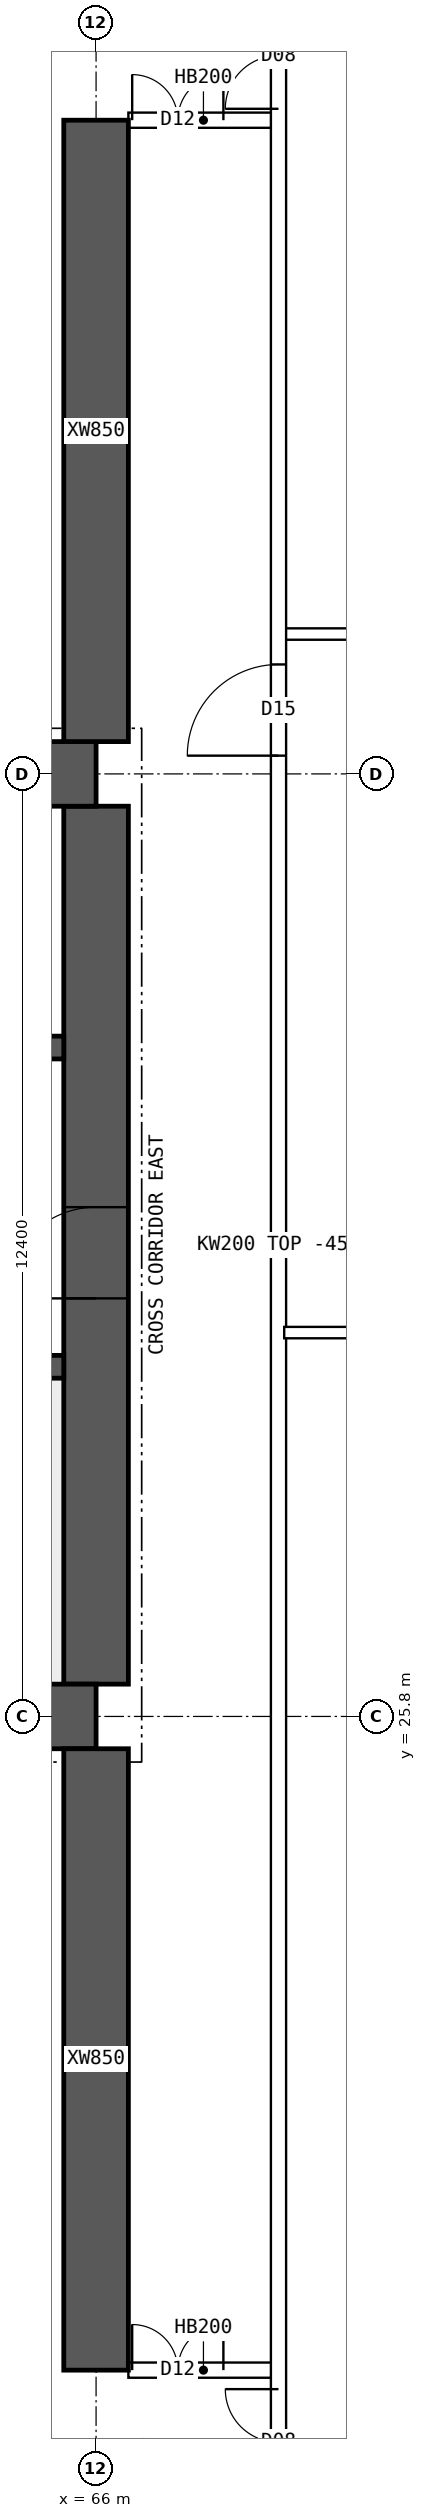
"""IFC4 building model, lengths in metres.
Left out: names, types, materials, properties, quantities, classifications, styles, units other than length and angle.
Written with IfcOpenShell. Run it as: python <this file> out.ifc"""

import sys

from ifc_helpers import new_model, si_unit, direction, frame, frame_2d, origin, place, context, subcontext, project, spatial, polyline, rectangle, outline, extrude, element, fill, save


model = new_model("IFC4")
c1 = context("Model", 3, precision=1e-05, world=origin(), true_north=direction((0.0, 1.0)))
c2 = subcontext(c1, "Body", "Model", "MODEL_VIEW")
j1 = project(units=[si_unit("LENGTHUNIT", "METRE"), si_unit("PLANEANGLEUNIT", "RADIAN")], contexts=[c1])
p1 = place(None, origin())
s1 = spatial("IfcSite", under=j1, at=p1, CompositionType="ELEMENT")
p2 = place(p1, origin())
s2 = spatial("IfcBuilding", under=s1, at=p2, CompositionType="ELEMENT")
p3 = place(p2, frame((0.0, 0.0, 144.85)))
s3 = spatial("IfcBuildingStorey", under=s2, at=p3, CompositionType="ELEMENT", Elevation=144.85)
for number, where, z_axis, x_axis in (
    (1, (18.0, 25.8, 0.0), (0.0, 0.0, 1.0), (1.0, 0.0, 0.0)),
    (2, (18.0, 38.2, 0.0), (0.0, 0.0, 1.0), (1.0, 0.0, 0.0)),
):
    element("IfcWall", number, at=place(p3, frame(where, z_axis=z_axis, x_axis=x_axis)), inside=s3, PredefinedType="SHEAR", context=c2, shape_type="SweptSolid", body=[
        extrude(rectangle(XDim=48.0, YDim=0.85, at=frame_2d((24.0, 0.0))), origin(), (0.0, 0.0, 1.0), 3.75),
    ])
p4 = place(p3, frame((66.0, 26.225, 0.0), z_axis=(0.0, 0.0, 1.0), x_axis=(0.0, 1.0, 0.0)))
e3 = element("IfcWall", 3, at=p4, inside=s3, PredefinedType="SHEAR", context=c2, shape_type="SweptSolid", body=[
    extrude(rectangle(XDim=11.55, YDim=0.85, at=frame_2d((5.775, 0.0))), origin(), (0.0, 0.0, 1.0), 3.75),
])
p5 = place(p4, frame((5.075, 0.0, 0.0)))
e4 = element("IfcOpeningElement", 4, at=p5, cuts=e3, PredefinedType="OPENING", context=c2, shape_type="SweptSolid", body=[
    extrude(rectangle(XDim=1.2, YDim=2.1, at=frame_2d((0.6, 1.05))), frame((0.0, 0.435, 0.0), z_axis=(0.0, -1.0, 0.0), x_axis=(1.0, 0.0, 0.0)), (0.0, 0.0, 1.0), 0.87),
])
p6 = place(p3, frame((18.425, 30.4, 0.0), z_axis=(0.0, 0.0, 1.0), x_axis=(1.0, 0.0, 0.0)))
e5 = element("IfcWall", 5, at=p6, inside=s3, PredefinedType="SHEAR", context=c2, shape_type="SweptSolid", body=[
    extrude(rectangle(XDim=47.15, YDim=0.3, at=frame_2d((23.575, 0.0))), origin(), (0.0, 0.0, 1.0), 3.75),
])
p7 = place(p6, frame((0.4, 0.0, 0.0)))
e6 = element("IfcOpeningElement", 6, at=p7, cuts=e5, PredefinedType="OPENING", context=c2, shape_type="SweptSolid", body=[
    extrude(rectangle(XDim=1.0, YDim=2.1, at=frame_2d((0.5, 1.05))), frame((0.0, 0.16, 0.0), z_axis=(0.0, -1.0, 0.0), x_axis=(1.0, 0.0, 0.0)), (0.0, 0.0, 1.0), 0.32),
])
p8 = place(p6, frame((45.75, 0.0, 0.0)))
e7 = element("IfcOpeningElement", 7, at=p8, cuts=e5, PredefinedType="OPENING", context=c2, shape_type="SweptSolid", body=[
    extrude(rectangle(XDim=1.0, YDim=2.1, at=frame_2d((0.5, 1.05))), frame((0.0, 0.16, 0.0), z_axis=(0.0, -1.0, 0.0), x_axis=(1.0, 0.0, 0.0)), (0.0, 0.0, 1.0), 0.32),
])
p9 = place(p6, frame((8.325, 0.0, 0.0)))
e8 = element("IfcOpeningElement", 8, at=p9, cuts=e5, PredefinedType="OPENING", context=c2, shape_type="SweptSolid", body=[
    extrude(rectangle(XDim=1.1, YDim=2.1, at=frame_2d((0.55, 1.05))), frame((0.0, 0.16, 0.0), z_axis=(0.0, -1.0, 0.0), x_axis=(1.0, 0.0, 0.0)), (0.0, 0.0, 1.0), 0.32),
])
p10 = place(p6, frame((10.925, 0.0, 0.0)))
e9 = element("IfcOpeningElement", 9, at=p10, cuts=e5, PredefinedType="OPENING", context=c2, shape_type="SweptSolid", body=[
    extrude(rectangle(XDim=1.1, YDim=2.1, at=frame_2d((0.55, 1.05))), frame((0.0, 0.16, 0.0), z_axis=(0.0, -1.0, 0.0), x_axis=(1.0, 0.0, 0.0)), (0.0, 0.0, 1.0), 0.32),
])
p11 = place(p6, frame((13.525, 0.0, 0.0)))
e10 = element("IfcOpeningElement", 10, at=p11, cuts=e5, PredefinedType="OPENING", context=c2, shape_type="SweptSolid", body=[
    extrude(rectangle(XDim=1.1, YDim=2.1, at=frame_2d((0.55, 1.05))), frame((0.0, 0.16, 0.0), z_axis=(0.0, -1.0, 0.0), x_axis=(1.0, 0.0, 0.0)), (0.0, 0.0, 1.0), 0.32),
])
p12 = place(p6, frame((16.125, 0.0, 0.0)))
e11 = element("IfcOpeningElement", 11, at=p12, cuts=e5, PredefinedType="OPENING", context=c2, shape_type="SweptSolid", body=[
    extrude(rectangle(XDim=1.1, YDim=2.1, at=frame_2d((0.55, 1.05))), frame((0.0, 0.16, 0.0), z_axis=(0.0, -1.0, 0.0), x_axis=(1.0, 0.0, 0.0)), (0.0, 0.0, 1.0), 0.32),
])
p13 = place(p6, frame((18.9, 0.0, 0.0)))
e12 = element("IfcOpeningElement", 12, at=p13, cuts=e5, PredefinedType="OPENING", context=c2, shape_type="SweptSolid", body=[
    extrude(rectangle(XDim=0.9, YDim=2.1, at=frame_2d((0.45, 1.05))), frame((0.0, 0.16, 0.0), z_axis=(0.0, -1.0, 0.0), x_axis=(1.0, 0.0, 0.0)), (0.0, 0.0, 1.0), 0.32),
])
p14 = place(p6, frame((30.192, 0.0, 0.0)))
e13 = element("IfcOpeningElement", 13, at=p14, cuts=e5, PredefinedType="OPENING", context=c2, shape_type="SweptSolid", body=[
    extrude(rectangle(XDim=1.1, YDim=2.1, at=frame_2d((0.55, 1.05))), frame((0.0, 0.16, 0.0), z_axis=(0.0, -1.0, 0.0), x_axis=(1.0, 0.0, 0.0)), (0.0, 0.0, 1.0), 0.32),
])
p15 = place(p6, frame((33.725, 0.0, 0.0)))
e14 = element("IfcOpeningElement", 14, at=p15, cuts=e5, PredefinedType="OPENING", context=c2, shape_type="SweptSolid", body=[
    extrude(rectangle(XDim=1.1, YDim=2.1, at=frame_2d((0.55, 1.05))), frame((0.0, 0.16, 0.0), z_axis=(0.0, -1.0, 0.0), x_axis=(1.0, 0.0, 0.0)), (0.0, 0.0, 1.0), 0.32),
])
p16 = place(p6, frame((37.258, 0.0, 0.0)))
e15 = element("IfcOpeningElement", 15, at=p16, cuts=e5, PredefinedType="OPENING", context=c2, shape_type="SweptSolid", body=[
    extrude(rectangle(XDim=1.1, YDim=2.1, at=frame_2d((0.55, 1.05))), frame((0.0, 0.16, 0.0), z_axis=(0.0, -1.0, 0.0), x_axis=(1.0, 0.0, 0.0)), (0.0, 0.0, 1.0), 0.32),
])
p17 = place(p3, frame((18.425, 34.6, 0.0), z_axis=(0.0, 0.0, 1.0), x_axis=(1.0, 0.0, 0.0)))
e16 = element("IfcWall", 16, at=p17, inside=s3, PredefinedType="SHEAR", context=c2, shape_type="SweptSolid", body=[
    extrude(rectangle(XDim=47.15, YDim=0.3, at=frame_2d((23.575, 0.0))), origin(), (0.0, 0.0, 1.0), 3.75),
])
p18 = place(p17, frame((0.9, 0.0, 0.0)))
e17 = element("IfcOpeningElement", 17, at=p18, cuts=e16, PredefinedType="OPENING", context=c2, shape_type="SweptSolid", body=[
    extrude(rectangle(XDim=1.1, YDim=2.1, at=frame_2d((0.55, 1.05))), frame((0.0, 0.16, 0.0), z_axis=(0.0, -1.0, 0.0), x_axis=(1.0, 0.0, 0.0)), (0.0, 0.0, 1.0), 0.32),
])
p19 = place(p17, frame((45.15, 0.0, 0.0)))
e18 = element("IfcOpeningElement", 18, at=p19, cuts=e16, PredefinedType="OPENING", context=c2, shape_type="SweptSolid", body=[
    extrude(rectangle(XDim=1.1, YDim=2.1, at=frame_2d((0.55, 1.05))), frame((0.0, 0.16, 0.0), z_axis=(0.0, -1.0, 0.0), x_axis=(1.0, 0.0, 0.0)), (0.0, 0.0, 1.0), 0.32),
])
p20 = place(p17, frame((4.175, 0.0, 0.0)))
e19 = element("IfcOpeningElement", 19, at=p20, cuts=e16, PredefinedType="OPENING", context=c2, shape_type="SweptSolid", body=[
    extrude(rectangle(XDim=0.9, YDim=2.1, at=frame_2d((0.45, 1.05))), frame((0.0, 0.16, 0.0), z_axis=(0.0, -1.0, 0.0), x_axis=(1.0, 0.0, 0.0)), (0.0, 0.0, 1.0), 0.32),
])
p21 = place(p17, frame((42.075, 0.0, 0.0)))
e20 = element("IfcOpeningElement", 20, at=p21, cuts=e16, PredefinedType="OPENING", context=c2, shape_type="SweptSolid", body=[
    extrude(rectangle(XDim=0.9, YDim=2.1, at=frame_2d((0.45, 1.05))), frame((0.0, 0.16, 0.0), z_axis=(0.0, -1.0, 0.0), x_axis=(1.0, 0.0, 0.0)), (0.0, 0.0, 1.0), 0.32),
])
p22 = place(p17, frame((8.95, 0.0, 0.0)))
e21 = element("IfcOpeningElement", 21, at=p22, cuts=e16, PredefinedType="OPENING", context=c2, shape_type="SweptSolid", body=[
    extrude(rectangle(XDim=0.9, YDim=2.1, at=frame_2d((0.45, 1.05))), frame((0.0, 0.16, 0.0), z_axis=(0.0, -1.0, 0.0), x_axis=(1.0, 0.0, 0.0)), (0.0, 0.0, 1.0), 0.32),
])
p23 = place(p17, frame((12.924, 0.0, 0.0)))
e22 = element("IfcOpeningElement", 22, at=p23, cuts=e16, PredefinedType="OPENING", context=c2, shape_type="SweptSolid", body=[
    extrude(rectangle(XDim=0.9, YDim=2.1, at=frame_2d((0.45, 1.05))), frame((0.0, 0.16, 0.0), z_axis=(0.0, -1.0, 0.0), x_axis=(1.0, 0.0, 0.0)), (0.0, 0.0, 1.0), 0.32),
])
p24 = place(p17, frame((16.571, 0.0, 0.0)))
e23 = element("IfcOpeningElement", 23, at=p24, cuts=e16, PredefinedType="OPENING", context=c2, shape_type="SweptSolid", body=[
    extrude(rectangle(XDim=0.9, YDim=2.1, at=frame_2d((0.45, 1.05))), frame((0.0, 0.16, 0.0), z_axis=(0.0, -1.0, 0.0), x_axis=(1.0, 0.0, 0.0)), (0.0, 0.0, 1.0), 0.32),
])
p25 = place(p17, frame((20.33, 0.0, 0.0)))
e24 = element("IfcOpeningElement", 24, at=p25, cuts=e16, PredefinedType="OPENING", context=c2, shape_type="SweptSolid", body=[
    extrude(rectangle(XDim=0.9, YDim=2.1, at=frame_2d((0.45, 1.05))), frame((0.0, 0.16, 0.0), z_axis=(0.0, -1.0, 0.0), x_axis=(1.0, 0.0, 0.0)), (0.0, 0.0, 1.0), 0.32),
])
p26 = place(p17, frame((24.736, 0.0, 0.0)))
e25 = element("IfcOpeningElement", 25, at=p26, cuts=e16, PredefinedType="OPENING", context=c2, shape_type="SweptSolid", body=[
    extrude(rectangle(XDim=0.9, YDim=2.1, at=frame_2d((0.45, 1.05))), frame((0.0, 0.16, 0.0), z_axis=(0.0, -1.0, 0.0), x_axis=(1.0, 0.0, 0.0)), (0.0, 0.0, 1.0), 0.32),
])
p27 = place(p17, frame((27.533, 0.0, 0.0)))
e26 = element("IfcOpeningElement", 26, at=p27, cuts=e16, PredefinedType="OPENING", context=c2, shape_type="SweptSolid", body=[
    extrude(rectangle(XDim=0.9, YDim=2.1, at=frame_2d((0.45, 1.05))), frame((0.0, 0.16, 0.0), z_axis=(0.0, -1.0, 0.0), x_axis=(1.0, 0.0, 0.0)), (0.0, 0.0, 1.0), 0.32),
])
p28 = place(p17, frame((30.716, 0.0, 0.0)))
e27 = element("IfcOpeningElement", 27, at=p28, cuts=e16, PredefinedType="OPENING", context=c2, shape_type="SweptSolid", body=[
    extrude(rectangle(XDim=0.9, YDim=2.1, at=frame_2d((0.45, 1.05))), frame((0.0, 0.16, 0.0), z_axis=(0.0, -1.0, 0.0), x_axis=(1.0, 0.0, 0.0)), (0.0, 0.0, 1.0), 0.32),
])
p29 = place(p17, frame((34.667, 0.0, 0.0)))
e28 = element("IfcOpeningElement", 28, at=p29, cuts=e16, PredefinedType="OPENING", context=c2, shape_type="SweptSolid", body=[
    extrude(rectangle(XDim=0.9, YDim=2.1, at=frame_2d((0.45, 1.05))), frame((0.0, 0.16, 0.0), z_axis=(0.0, -1.0, 0.0), x_axis=(1.0, 0.0, 0.0)), (0.0, 0.0, 1.0), 0.32),
])
p30 = place(p17, frame((37.605, 0.0, 0.0)))
e29 = element("IfcOpeningElement", 29, at=p30, cuts=e16, PredefinedType="OPENING", context=c2, shape_type="SweptSolid", body=[
    extrude(rectangle(XDim=0.9, YDim=2.1, at=frame_2d((0.45, 1.05))), frame((0.0, 0.16, 0.0), z_axis=(0.0, -1.0, 0.0), x_axis=(1.0, 0.0, 0.0)), (0.0, 0.0, 1.0), 0.32),
])
for number, where, z_axis, x_axis in (
    (30, (66.0, 17.2, 0.0), (0.0, 0.0, 1.0), (0.0, 1.0, 0.0)),
    (31, (66.0, 38.625, 0.0), (0.0, 0.0, 1.0), (0.0, 1.0, 0.0)),
):
    element("IfcWall", number, at=place(p3, frame(where, z_axis=z_axis, x_axis=x_axis)), inside=s3, PredefinedType="SHEAR", context=c2, shape_type="SweptSolid", body=[
        extrude(rectangle(XDim=8.175, YDim=0.85, at=frame_2d((4.087, 0.0))), origin(), (0.0, 0.0, 1.0), 3.75),
    ])
p31 = place(p3, frame((66.425, 17.2, 0.0), z_axis=(0.0, 0.0, 1.0), x_axis=(1.0, 0.0, 0.0)))
e32 = element("IfcWall", 32, at=p31, inside=s3, PredefinedType="SOLIDWALL", context=c2, shape_type="SweptSolid", body=[
    extrude(rectangle(XDim=1.975, YDim=0.2, at=frame_2d((0.987, 0.0))), origin(), (0.0, 0.0, 1.0), 3.3),
])
p32 = place(p31, frame((0.05, 0.0, 0.0)))
e33 = element("IfcOpeningElement", 33, at=p32, cuts=e32, PredefinedType="OPENING", context=c2, shape_type="SweptSolid", body=[
    extrude(rectangle(XDim=1.2, YDim=2.1, at=frame_2d((0.6, 1.05))), frame((0.0, 0.11, 0.0), z_axis=(0.0, -1.0, 0.0), x_axis=(1.0, 0.0, 0.0)), (0.0, 0.0, 1.0), 0.22),
])
p33 = place(p3, frame((66.425, 46.8, 0.0), z_axis=(0.0, 0.0, 1.0), x_axis=(1.0, 0.0, 0.0)))
e34 = element("IfcWall", 34, at=p33, inside=s3, PredefinedType="SOLIDWALL", context=c2, shape_type="SweptSolid", body=[
    extrude(rectangle(XDim=1.975, YDim=0.2, at=frame_2d((0.987, 0.0))), origin(), (0.0, 0.0, 1.0), 3.3),
])
p34 = place(p33, frame((0.05, 0.0, 0.0)))
e35 = element("IfcOpeningElement", 35, at=p34, cuts=e34, PredefinedType="OPENING", context=c2, shape_type="SweptSolid", body=[
    extrude(rectangle(XDim=1.2, YDim=2.1, at=frame_2d((0.6, 1.05))), frame((0.0, 0.11, 0.0), z_axis=(0.0, -1.0, 0.0), x_axis=(1.0, 0.0, 0.0)), (0.0, 0.0, 1.0), 0.22),
])
p35 = place(p3, frame((68.475, 30.85, 0.0), z_axis=(0.0, 0.0, 1.0), x_axis=(1.0, 0.0, 0.0)))
e36 = element("IfcWall", 36, at=p35, inside=s3, PredefinedType="PARTITIONING", context=c2, shape_type="SweptSolid", body=[
    extrude(outline(polyline([(0.0, 0.0), (6.82, 0.0), (6.82, 3.3), (3.827, 3.3), (3.825, 2.85), (3.227, 2.85), (3.225, 3.3), (0.0, 3.3), (0.0, 0.0)])), frame((0.0, 0.075, 0.0), z_axis=(0.0, -1.0, 0.0), x_axis=(1.0, 0.0, 0.0)), (0.0, 0.0, 1.0), 0.15),
])
p36 = place(p3, frame((68.4, 10.446, 0.0), z_axis=(0.0, 0.0, 1.0), x_axis=(0.0, 1.0, 0.0)))
e37 = element("IfcWall", 37, at=p36, inside=s3, PredefinedType="SOLIDWALL", context=c2, shape_type="SweptSolid", body=[
    extrude(rectangle(XDim=43.107, YDim=0.2, at=frame_2d((21.554, 0.0))), origin(), (0.0, 0.0, 1.0), 3.3),
])
p37 = place(p36, frame((27.994, 0.0, 0.0)))
e38 = element("IfcOpeningElement", 38, at=p37, cuts=e37, PredefinedType="OPENING", context=c2, shape_type="SweptSolid", body=[
    extrude(rectangle(XDim=1.2, YDim=2.1, at=frame_2d((0.6, 1.05))), frame((0.0, 0.11, 0.0), z_axis=(0.0, -1.0, 0.0), x_axis=(1.0, 0.0, 0.0)), (0.0, 0.0, 1.0), 0.22),
])
p38 = place(p36, frame((5.104, 0.0, 0.0)))
e39 = element("IfcOpeningElement", 39, at=p38, cuts=e37, PredefinedType="OPENING", context=c2, shape_type="SweptSolid", body=[
    extrude(rectangle(XDim=1.4, YDim=2.1, at=frame_2d((0.7, 1.05))), frame((0.0, 0.11, 0.0), z_axis=(0.0, -1.0, 0.0), x_axis=(1.0, 0.0, 0.0)), (0.0, 0.0, 1.0), 0.22),
])
p39 = place(p36, frame((36.504, 0.0, 0.0)))
e40 = element("IfcOpeningElement", 40, at=p39, cuts=e37, PredefinedType="OPENING", context=c2, shape_type="SweptSolid", body=[
    extrude(rectangle(XDim=1.4, YDim=2.1, at=frame_2d((0.7, 1.05))), frame((0.0, 0.11, 0.0), z_axis=(0.0, -1.0, 0.0), x_axis=(1.0, 0.0, 0.0)), (0.0, 0.0, 1.0), 0.22),
])
p40 = place(p3, frame((68.475, 40.04, 0.0), z_axis=(0.0, 0.0, 1.0), x_axis=(1.0, 0.0, 0.0)))
e41 = element("IfcWall", 41, at=p40, inside=s3, PredefinedType="PARTITIONING", context=c2, shape_type="SweptSolid", body=[
    extrude(rectangle(XDim=6.82, YDim=0.15, at=frame_2d((3.41, 0.0))), origin(), (0.0, 0.0, 1.0), 3.3),
])
p41 = place(p5, origin())
e42 = element("IfcDoor", 42, at=p41, inside=s3, OperationType="SINGLE_SWING_LEFT", PredefinedType="DOOR", context=c2, shape_type="SweptSolid", body=[
    extrude(rectangle(XDim=1.2, YDim=2.1, at=frame_2d((0.6, 1.05))), frame((0.0, 0.025, 0.0), z_axis=(0.0, -1.0, 0.0), x_axis=(1.0, 0.0, 0.0)), (0.0, 0.0, 1.0), 0.05),
])
fill(e4, e42)
p42 = place(p32, origin())
e43 = element("IfcDoor", 43, at=p42, inside=s3, OperationType="DOUBLE_DOOR_SINGLE_SWING", PredefinedType="DOOR", context=c2, shape_type="SweptSolid", body=[
    extrude(rectangle(XDim=1.2, YDim=2.1, at=frame_2d((0.6, 1.05))), frame((0.0, 0.025, 0.0), z_axis=(0.0, -1.0, 0.0), x_axis=(1.0, 0.0, 0.0)), (0.0, 0.0, 1.0), 0.05),
])
fill(e33, e43)
p43 = place(p34, origin())
e44 = element("IfcDoor", 44, at=p43, inside=s3, OperationType="DOUBLE_DOOR_SINGLE_SWING", PredefinedType="DOOR", context=c2, shape_type="SweptSolid", body=[
    extrude(rectangle(XDim=1.2, YDim=2.1, at=frame_2d((0.6, 1.05))), frame((0.0, 0.025, 0.0), z_axis=(0.0, -1.0, 0.0), x_axis=(1.0, 0.0, 0.0)), (0.0, 0.0, 1.0), 0.05),
])
fill(e35, e44)
p44 = place(p37, origin())
e45 = element("IfcDoor", 45, at=p44, inside=s3, OperationType="SINGLE_SWING_LEFT", PredefinedType="DOOR", context=c2, shape_type="SweptSolid", body=[
    extrude(rectangle(XDim=1.2, YDim=2.1, at=frame_2d((0.6, 1.05))), frame((0.0, 0.025, 0.0), z_axis=(0.0, -1.0, 0.0), x_axis=(1.0, 0.0, 0.0)), (0.0, 0.0, 1.0), 0.05),
])
fill(e38, e45)
p45 = place(p38, origin())
e46 = element("IfcDoor", 46, at=p45, inside=s3, OperationType="DOUBLE_DOOR_SINGLE_SWING", PredefinedType="DOOR", context=c2, shape_type="SweptSolid", body=[
    extrude(rectangle(XDim=1.4, YDim=2.1, at=frame_2d((0.7, 1.05))), frame((0.0, 0.025, 0.0), z_axis=(0.0, -1.0, 0.0), x_axis=(1.0, 0.0, 0.0)), (0.0, 0.0, 1.0), 0.05),
])
fill(e39, e46)
p46 = place(p39, origin())
e47 = element("IfcDoor", 47, at=p46, inside=s3, OperationType="DOUBLE_DOOR_SINGLE_SWING", PredefinedType="DOOR", context=c2, shape_type="SweptSolid", body=[
    extrude(rectangle(XDim=1.4, YDim=2.1, at=frame_2d((0.7, 1.05))), frame((0.0, 0.025, 0.0), z_axis=(0.0, -1.0, 0.0), x_axis=(1.0, 0.0, 0.0)), (0.0, 0.0, 1.0), 0.05),
])
fill(e40, e47)
save(model, sys.argv[1])
